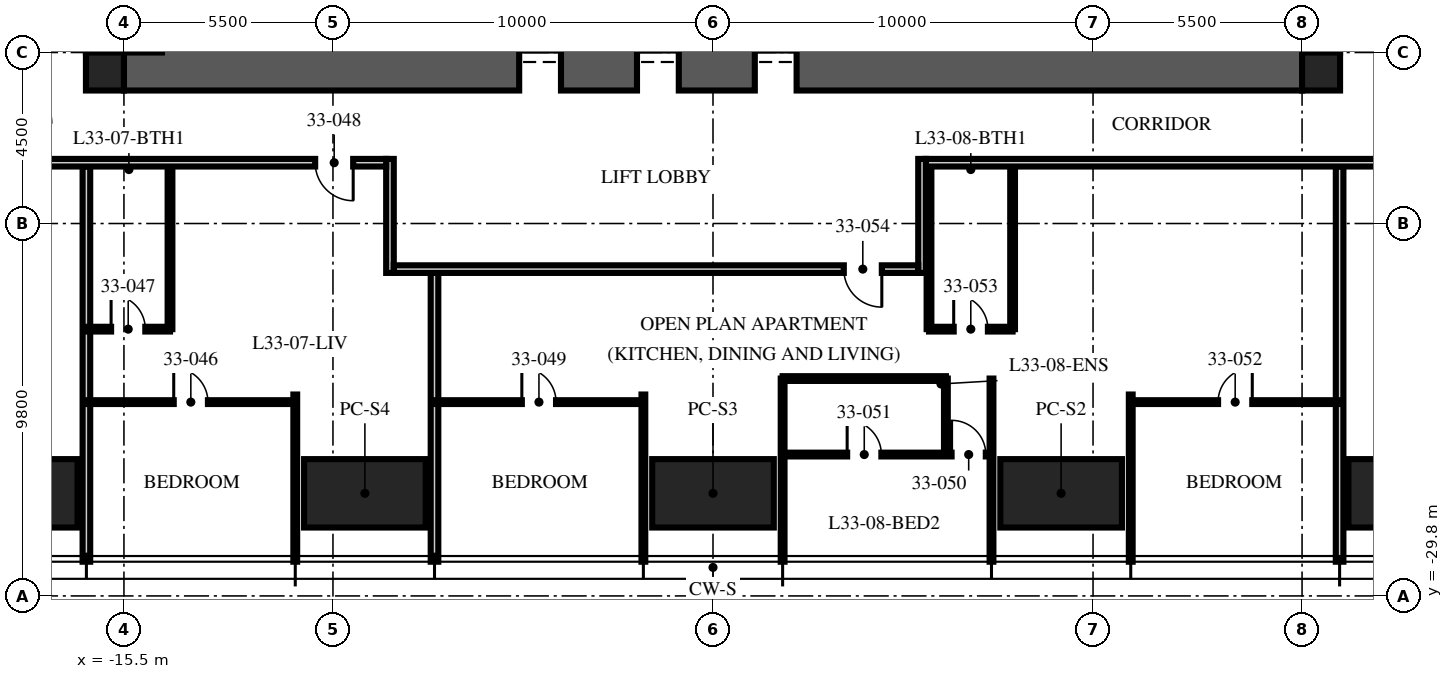
"""IFC4 building model, lengths in metres.
Left out: names, types, materials, properties, quantities, classifications, styles, units other than length and angle.
Written with IfcOpenShell. Run it as: python <this file> out.ifc"""

import sys

from ifc_helpers import new_model, si_unit, direction, frame, frame_2d, origin, origin_2d, place, context, subcontext, project, spatial, rectangle, extrude, element, fill, save


model = new_model("IFC4")
c1 = context("Model", 3, precision=1e-05, world=origin(), true_north=direction((0.0, 1.0)))
c2 = subcontext(c1, "Body", "Model", "MODEL_VIEW")
j1 = project(units=[si_unit("LENGTHUNIT", "METRE"), si_unit("PLANEANGLEUNIT", "RADIAN")], contexts=[c1])
p1 = place(None, origin())
s1 = spatial("IfcSite", under=j1, at=p1, CompositionType="ELEMENT")
p2 = place(p1, origin())
s2 = spatial("IfcBuilding", under=s1, at=p2, CompositionType="ELEMENT")
p3 = place(p2, frame((0.0, 0.0, 133.5)))
s3 = spatial("IfcBuildingStorey", under=s2, at=p3, CompositionType="ELEMENT", Elevation=133.5)
p4 = place(p3, frame((-15.5, -15.5, -0.25), z_axis=(0.0, 0.0, 1.0), x_axis=(1.0, 0.0, 0.0)))
e1 = element("IfcWall", 1, at=p4, inside=s3, PredefinedType="SHEAR", context=c2, shape_type="SweptSolid", body=[
    extrude(rectangle(XDim=31.0, YDim=2.0, at=frame_2d((15.5, 0.0))), origin(), (0.0, 0.0, 1.0), 3.75),
])
p5 = place(p4, frame((10.4, 0.0, 0.25)))
e2 = element("IfcOpeningElement", 2, at=p5, cuts=e1, PredefinedType="OPENING", context=c2, shape_type="SweptSolid", body=[
    extrude(rectangle(XDim=1.1, YDim=2.1, at=frame_2d((0.55, 1.05))), frame((0.0, 1.01, 0.0), z_axis=(0.0, -1.0, 0.0), x_axis=(1.0, 0.0, 0.0)), (0.0, 0.0, 1.0), 2.02),
])
p6 = place(p4, frame((13.5, 0.0, 0.25)))
e3 = element("IfcOpeningElement", 3, at=p6, cuts=e1, PredefinedType="OPENING", context=c2, shape_type="SweptSolid", body=[
    extrude(rectangle(XDim=1.1, YDim=2.1, at=frame_2d((0.55, 1.05))), frame((0.0, 1.01, 0.0), z_axis=(0.0, -1.0, 0.0), x_axis=(1.0, 0.0, 0.0)), (0.0, 0.0, 1.0), 2.02),
])
p7 = place(p4, frame((16.6, 0.0, 0.25)))
e4 = element("IfcOpeningElement", 4, at=p7, cuts=e1, PredefinedType="OPENING", context=c2, shape_type="SweptSolid", body=[
    extrude(rectangle(XDim=1.1, YDim=2.1, at=frame_2d((0.55, 1.05))), frame((0.0, 1.01, 0.0), z_axis=(0.0, -1.0, 0.0), x_axis=(1.0, 0.0, 0.0)), (0.0, 0.0, 1.0), 2.02),
])
for number, where, z_axis, x_axis in (
    (5, (-16.0, -16.0, -0.25), (0.0, 0.0, 1.0), (1.0, 0.0, 0.0)),
    (6, (16.0, -16.0, -0.25), (0.0, 0.0, 1.0), (1.0, 0.0, 0.0)),
):
    element("IfcColumn", number, at=place(p3, frame(where, z_axis=z_axis, x_axis=x_axis)), inside=s3, PredefinedType="COLUMN", context=c2, shape_type="SweptSolid", body=[
        extrude(rectangle(XDim=1.0, YDim=1.0, at=origin_2d()), origin(), (0.0, 0.0, 1.0), 3.75),
    ])
for number, where, z_axis, x_axis in (
    (7, (18.32, -27.1, 0.0), (0.0, 0.0, 1.0), (1.0, 0.0, 0.0)),
    (8, (9.16, -27.1, 0.0), (0.0, 0.0, 1.0), (1.0, 0.0, 0.0)),
    (9, (0.0, -27.1, 0.0), (0.0, 0.0, 1.0), (1.0, 0.0, 0.0)),
    (10, (-9.16, -27.1, 0.0), (0.0, 0.0, 1.0), (1.0, 0.0, 0.0)),
    (11, (-18.32, -27.1, 0.0), (0.0, 0.0, 1.0), (1.0, 0.0, 0.0)),
):
    element("IfcColumn", number, at=place(p3, frame(where, z_axis=z_axis, x_axis=x_axis)), inside=s3, PredefinedType="COLUMN", context=c2, shape_type="SweptSolid", body=[
        extrude(rectangle(XDim=3.2, YDim=1.8, at=origin_2d()), origin(), (0.0, 0.0, 1.0), 3.75),
    ])
p8 = place(p3, frame((-16.488, -18.5, 0.0), z_axis=(0.0, 0.0, 1.0), x_axis=(0.0, -1.0, 0.0)))
e12 = element("IfcWall", 12, at=p8, inside=s3, PredefinedType="PARTITIONING", context=c2, shape_type="SweptSolid", body=[
    extrude(rectangle(XDim=10.4, YDim=0.2, at=frame_2d((5.2, 0.0))), origin(), (0.0, 0.0, 1.0), 2.81),
])
p9 = place(p3, frame((-10.992, -24.5, 0.0), z_axis=(0.0, 0.0, 1.0), x_axis=(0.0, -1.0, 0.0)))
e13 = element("IfcWall", 13, at=p9, inside=s3, PredefinedType="PARTITIONING", context=c2, shape_type="SweptSolid", body=[
    extrude(rectangle(XDim=4.4, YDim=0.1, at=frame_2d((2.2, 0.0))), origin(), (0.0, 0.0, 1.0), 2.81),
])
p10 = place(p3, frame((-7.328, -21.3, 0.0), z_axis=(0.0, 0.0, 1.0), x_axis=(0.0, -1.0, 0.0)))
e14 = element("IfcWall", 14, at=p10, inside=s3, PredefinedType="PARTITIONING", context=c2, shape_type="SweptSolid", body=[
    extrude(rectangle(XDim=7.6, YDim=0.2, at=frame_2d((3.8, 0.0))), origin(), (0.0, 0.0, 1.0), 2.81),
])
p11 = place(p3, frame((-1.832, -24.5, 0.0), z_axis=(0.0, 0.0, 1.0), x_axis=(0.0, -1.0, 0.0)))
e15 = element("IfcWall", 15, at=p11, inside=s3, PredefinedType="PARTITIONING", context=c2, shape_type="SweptSolid", body=[
    extrude(rectangle(XDim=4.4, YDim=0.1, at=frame_2d((2.2, 0.0))), origin(), (0.0, 0.0, 1.0), 2.81),
])
for number, where, z_axis, x_axis in (
    (16, (1.832, -24.08, 0.0), (0.0, 0.0, 1.0), (0.0, -1.0, 0.0)),
    (17, (7.328, -24.08, 0.0), (0.0, 0.0, 1.0), (0.0, -1.0, 0.0)),
):
    element("IfcWall", number, at=place(p3, frame(where, z_axis=z_axis, x_axis=x_axis)), inside=s3, PredefinedType="PARTITIONING", context=c2, shape_type="SweptSolid", body=[
        extrude(rectangle(XDim=4.82, YDim=0.1, at=frame_2d((2.41, 0.0))), origin(), (0.0, 0.0, 1.0), 2.81),
    ])
p12 = place(p3, frame((10.992, -24.5, 0.0), z_axis=(0.0, 0.0, 1.0), x_axis=(0.0, -1.0, 0.0)))
e18 = element("IfcWall", 18, at=p12, inside=s3, PredefinedType="PARTITIONING", context=c2, shape_type="SweptSolid", body=[
    extrude(rectangle(XDim=4.4, YDim=0.1, at=frame_2d((2.2, 0.0))), origin(), (0.0, 0.0, 1.0), 2.81),
])
p13 = place(p3, frame((16.488, -18.5, 0.0), z_axis=(0.0, 0.0, 1.0), x_axis=(0.0, -1.0, 0.0)))
e19 = element("IfcWall", 19, at=p13, inside=s3, PredefinedType="PARTITIONING", context=c2, shape_type="SweptSolid", body=[
    extrude(rectangle(XDim=10.4, YDim=0.2, at=frame_2d((5.2, 0.0))), origin(), (0.0, 0.0, 1.0), 2.81),
])
p14 = place(p3, frame((-16.488, -24.7, 0.0), z_axis=(0.0, 0.0, 1.0), x_axis=(1.0, 0.0, 0.0)))
e20 = element("IfcWall", 20, at=p14, inside=s3, PredefinedType="PARTITIONING", context=c2, shape_type="SweptSolid", body=[
    extrude(rectangle(XDim=5.496, YDim=0.1, at=frame_2d((2.748, 0.0))), origin(), (0.0, 0.0, 1.0), 2.81),
])
p15 = place(p14, frame((2.298, 0.0, 0.0)))
e21 = element("IfcOpeningElement", 21, at=p15, cuts=e20, PredefinedType="OPENING", context=c2, shape_type="SweptSolid", body=[
    extrude(rectangle(XDim=0.9, YDim=2.1, at=frame_2d((0.45, 1.05))), frame((0.0, 0.06, 0.0), z_axis=(0.0, -1.0, 0.0), x_axis=(1.0, 0.0, 0.0)), (0.0, 0.0, 1.0), 0.12),
])
p16 = place(p3, frame((-16.488, -22.78, 0.0), z_axis=(0.0, 0.0, 1.0), x_axis=(1.0, 0.0, 0.0)))
e22 = element("IfcWall", 22, at=p16, inside=s3, PredefinedType="PARTITIONING", context=c2, shape_type="SweptSolid", body=[
    extrude(rectangle(XDim=2.2, YDim=0.125, at=frame_2d((1.1, 0.0))), origin(), (0.0, 0.0, 1.0), 3.5),
])
p17 = place(p16, frame((0.65, 0.0, 0.0)))
e23 = element("IfcOpeningElement", 23, at=p17, cuts=e22, PredefinedType="OPENING", context=c2, shape_type="SweptSolid", body=[
    extrude(rectangle(XDim=0.9, YDim=2.1, at=frame_2d((0.45, 1.05))), frame((0.0, 0.073, 0.0), z_axis=(0.0, -1.0, 0.0), x_axis=(1.0, 0.0, 0.0)), (0.0, 0.0, 1.0), 0.145),
])
p18 = place(p3, frame((-14.288, -18.5, 0.0), z_axis=(0.0, 0.0, 1.0), x_axis=(0.0, -1.0, 0.0)))
e24 = element("IfcWall", 24, at=p18, inside=s3, PredefinedType="PARTITIONING", context=c2, shape_type="SweptSolid", body=[
    extrude(rectangle(XDim=4.28, YDim=0.125, at=frame_2d((2.14, 0.0))), origin(), (0.0, 0.0, 1.0), 3.5),
])
p19 = place(p3, frame((-7.328, -24.7, 0.0), z_axis=(0.0, 0.0, 1.0), x_axis=(1.0, 0.0, 0.0)))
e25 = element("IfcWall", 25, at=p19, inside=s3, PredefinedType="PARTITIONING", context=c2, shape_type="SweptSolid", body=[
    extrude(rectangle(XDim=5.496, YDim=0.1, at=frame_2d((2.748, 0.0))), origin(), (0.0, 0.0, 1.0), 2.81),
])
p20 = place(p19, frame((2.298, 0.0, 0.0)))
e26 = element("IfcOpeningElement", 26, at=p20, cuts=e25, PredefinedType="OPENING", context=c2, shape_type="SweptSolid", body=[
    extrude(rectangle(XDim=0.9, YDim=2.1, at=frame_2d((0.45, 1.05))), frame((0.0, 0.06, 0.0), z_axis=(0.0, -1.0, 0.0), x_axis=(1.0, 0.0, 0.0)), (0.0, 0.0, 1.0), 0.12),
])
p21 = place(p3, frame((1.832, -26.08, 0.0), z_axis=(0.0, 0.0, 1.0), x_axis=(1.0, 0.0, 0.0)))
e27 = element("IfcWall", 27, at=p21, inside=s3, PredefinedType="PARTITIONING", context=c2, shape_type="SweptSolid", body=[
    extrude(rectangle(XDim=5.496, YDim=0.1, at=frame_2d((2.748, 0.0))), origin(), (0.0, 0.0, 1.0), 2.81),
])
p22 = place(p21, frame((4.446, 0.0, 0.0)))
e28 = element("IfcOpeningElement", 28, at=p22, cuts=e27, PredefinedType="OPENING", context=c2, shape_type="SweptSolid", body=[
    extrude(rectangle(XDim=0.9, YDim=2.1, at=frame_2d((0.45, 1.05))), frame((0.0, 0.06, 0.0), z_axis=(0.0, -1.0, 0.0), x_axis=(1.0, 0.0, 0.0)), (0.0, 0.0, 1.0), 0.12),
])
p23 = place(p21, frame((1.698, 0.0, 0.0)))
e29 = element("IfcOpeningElement", 29, at=p23, cuts=e27, PredefinedType="OPENING", context=c2, shape_type="SweptSolid", body=[
    extrude(rectangle(XDim=0.9, YDim=2.1, at=frame_2d((0.45, 1.05))), frame((0.0, 0.06, 0.0), z_axis=(0.0, -1.0, 0.0), x_axis=(1.0, 0.0, 0.0)), (0.0, 0.0, 1.0), 0.12),
])
p24 = place(p3, frame((6.128, -24.08, 0.0), z_axis=(0.0, 0.0, 1.0), x_axis=(0.0, -1.0, 0.0)))
e30 = element("IfcWall", 30, at=p24, inside=s3, PredefinedType="PARTITIONING", context=c2, shape_type="SweptSolid", body=[
    extrude(rectangle(XDim=2.0, YDim=0.1, at=frame_2d((1.0, 0.0))), origin(), (0.0, 0.0, 1.0), 3.5),
])
p25 = place(p3, frame((1.832, -24.08, 0.0), z_axis=(0.0, 0.0, 1.0), x_axis=(1.0, 0.0, 0.0)))
e31 = element("IfcWall", 31, at=p25, inside=s3, PredefinedType="PARTITIONING", context=c2, shape_type="SweptSolid", body=[
    extrude(rectangle(XDim=4.296, YDim=0.125, at=frame_2d((2.148, 0.0))), origin(), (0.0, 0.0, 1.0), 2.81),
])
p26 = place(p3, frame((10.992, -24.7, 0.0), z_axis=(0.0, 0.0, 1.0), x_axis=(1.0, 0.0, 0.0)))
e32 = element("IfcWall", 32, at=p26, inside=s3, PredefinedType="PARTITIONING", context=c2, shape_type="SweptSolid", body=[
    extrude(rectangle(XDim=5.496, YDim=0.1, at=frame_2d((2.748, 0.0))), origin(), (0.0, 0.0, 1.0), 2.81),
])
p27 = place(p26, frame((2.298, 0.0, 0.0)))
e33 = element("IfcOpeningElement", 33, at=p27, cuts=e32, PredefinedType="OPENING", context=c2, shape_type="SweptSolid", body=[
    extrude(rectangle(XDim=0.9, YDim=2.1, at=frame_2d((0.45, 1.05))), frame((0.0, 0.06, 0.0), z_axis=(0.0, -1.0, 0.0), x_axis=(1.0, 0.0, 0.0)), (0.0, 0.0, 1.0), 0.12),
])
p28 = place(p3, frame((5.684, -22.78, 0.0), z_axis=(0.0, 0.0, 1.0), x_axis=(1.0, 0.0, 0.0)))
e34 = element("IfcWall", 34, at=p28, inside=s3, PredefinedType="PARTITIONING", context=c2, shape_type="SweptSolid", body=[
    extrude(rectangle(XDim=2.2, YDim=0.125, at=frame_2d((1.1, 0.0))), origin(), (0.0, 0.0, 1.0), 3.5),
])
p29 = place(p28, frame((0.65, 0.0, 0.0)))
e35 = element("IfcOpeningElement", 35, at=p29, cuts=e34, PredefinedType="OPENING", context=c2, shape_type="SweptSolid", body=[
    extrude(rectangle(XDim=0.9, YDim=2.1, at=frame_2d((0.45, 1.05))), frame((0.0, 0.073, 0.0), z_axis=(0.0, -1.0, 0.0), x_axis=(1.0, 0.0, 0.0)), (0.0, 0.0, 1.0), 0.145),
])
for number, where, z_axis, x_axis in (
    (36, (5.684, -18.5, 0.0), (0.0, 0.0, 1.0), (0.0, -1.0, 0.0)),
    (37, (7.884, -18.5, 0.0), (0.0, 0.0, 1.0), (0.0, -1.0, 0.0)),
):
    element("IfcWall", number, at=place(p3, frame(where, z_axis=z_axis, x_axis=x_axis)), inside=s3, PredefinedType="PARTITIONING", context=c2, shape_type="SweptSolid", body=[
        extrude(rectangle(XDim=4.28, YDim=0.125, at=frame_2d((2.14, 0.0))), origin(), (0.0, 0.0, 1.0), 3.5),
    ])
p30 = place(p3, frame((18.5, -18.4, 0.0), z_axis=(0.0, 0.0, 1.0), x_axis=(-1.0, 0.0, 0.0)))
e38 = element("IfcWall", 38, at=p30, inside=s3, PredefinedType="PARTITIONING", context=c2, shape_type="SweptSolid", body=[
    extrude(rectangle(XDim=12.9, YDim=0.2, at=frame_2d((6.45, 0.0))), origin(), (0.0, 0.0, 1.0), 2.3),
])
for number, where, z_axis, x_axis in (
    (39, (5.5, -18.3, 0.0), (0.0, 0.0, 1.0), (0.0, -1.0, 0.0)),
    (40, (-8.5, -18.3, 0.0), (0.0, 0.0, 1.0), (0.0, -1.0, 0.0)),
):
    element("IfcWall", number, at=place(p3, frame(where, z_axis=z_axis, x_axis=x_axis)), inside=s3, PredefinedType="PARTITIONING", context=c2, shape_type="SweptSolid", body=[
        extrude(rectangle(XDim=3.0, YDim=0.2, at=frame_2d((1.5, 0.0))), origin(), (0.0, 0.0, 1.0), 3.5),
    ])
p31 = place(p3, frame((5.4, -21.2, 0.0), z_axis=(0.0, 0.0, 1.0), x_axis=(-1.0, 0.0, 0.0)))
e41 = element("IfcWall", 41, at=p31, inside=s3, PredefinedType="PARTITIONING", context=c2, shape_type="SweptSolid", body=[
    extrude(rectangle(XDim=13.8, YDim=0.2, at=frame_2d((6.9, 0.0))), origin(), (0.0, 0.0, 1.0), 2.7),
])
p32 = place(p31, frame((0.958, 0.0, 0.0)))
e42 = element("IfcOpeningElement", 42, at=p32, cuts=e41, PredefinedType="OPENING", context=c2, shape_type="SweptSolid", body=[
    extrude(rectangle(XDim=1.0, YDim=2.2, at=frame_2d((0.5, 1.1))), frame((0.0, 0.11, 0.0), z_axis=(0.0, -1.0, 0.0), x_axis=(1.0, 0.0, 0.0)), (0.0, 0.0, 1.0), 0.22),
])
p33 = place(p3, frame((-8.6, -18.4, 0.0), z_axis=(0.0, 0.0, 1.0), x_axis=(-1.0, 0.0, 0.0)))
e43 = element("IfcWall", 43, at=p33, inside=s3, PredefinedType="PARTITIONING", context=c2, shape_type="SweptSolid", body=[
    extrude(rectangle(XDim=9.9, YDim=0.2, at=frame_2d((4.95, 0.0))), origin(), (0.0, 0.0, 1.0), 2.3),
])
p34 = place(p33, frame((0.868, 0.0, 0.0)))
e44 = element("IfcOpeningElement", 44, at=p34, cuts=e43, PredefinedType="OPENING", context=c2, shape_type="SweptSolid", body=[
    extrude(rectangle(XDim=1.0, YDim=2.2, at=frame_2d((0.5, 1.1))), frame((0.0, 0.11, 0.0), z_axis=(0.0, -1.0, 0.0), x_axis=(1.0, 0.0, 0.0)), (0.0, 0.0, 1.0), 0.22),
])
p35 = place(p5, origin())
e45 = element("IfcDoor", 45, at=p35, inside=s3, OperationType="DOUBLE_DOOR_SLIDING", PredefinedType="DOOR", context=c2, shape_type="SweptSolid", body=[
    extrude(rectangle(XDim=1.1, YDim=2.1, at=frame_2d((0.55, 1.05))), frame((0.0, 0.025, 0.0), z_axis=(0.0, -1.0, 0.0), x_axis=(1.0, 0.0, 0.0)), (0.0, 0.0, 1.0), 0.05),
])
fill(e2, e45)
p36 = place(p6, origin())
e46 = element("IfcDoor", 46, at=p36, inside=s3, OperationType="DOUBLE_DOOR_SLIDING", PredefinedType="DOOR", context=c2, shape_type="SweptSolid", body=[
    extrude(rectangle(XDim=1.1, YDim=2.1, at=frame_2d((0.55, 1.05))), frame((0.0, 0.025, 0.0), z_axis=(0.0, -1.0, 0.0), x_axis=(1.0, 0.0, 0.0)), (0.0, 0.0, 1.0), 0.05),
])
fill(e3, e46)
p37 = place(p7, origin())
e47 = element("IfcDoor", 47, at=p37, inside=s3, OperationType="DOUBLE_DOOR_SLIDING", PredefinedType="DOOR", context=c2, shape_type="SweptSolid", body=[
    extrude(rectangle(XDim=1.1, YDim=2.1, at=frame_2d((0.55, 1.05))), frame((0.0, 0.025, 0.0), z_axis=(0.0, -1.0, 0.0), x_axis=(1.0, 0.0, 0.0)), (0.0, 0.0, 1.0), 0.05),
])
fill(e4, e47)
p38 = place(p15, origin())
e48 = element("IfcDoor", 48, at=p38, inside=s3, OperationType="SINGLE_SWING_LEFT", PredefinedType="DOOR", context=c2, shape_type="SweptSolid", body=[
    extrude(rectangle(XDim=0.9, YDim=2.1, at=frame_2d((0.45, 1.05))), frame((0.0, 0.025, 0.0), z_axis=(0.0, -1.0, 0.0), x_axis=(1.0, 0.0, 0.0)), (0.0, 0.0, 1.0), 0.05),
])
fill(e21, e48)
p39 = place(p17, origin())
e49 = element("IfcDoor", 49, at=p39, inside=s3, OperationType="SINGLE_SWING_LEFT", PredefinedType="DOOR", context=c2, shape_type="SweptSolid", body=[
    extrude(rectangle(XDim=0.9, YDim=2.1, at=frame_2d((0.45, 1.05))), frame((0.0, 0.025, 0.0), z_axis=(0.0, -1.0, 0.0), x_axis=(1.0, 0.0, 0.0)), (0.0, 0.0, 1.0), 0.05),
])
fill(e23, e49)
p40 = place(p34, origin())
e50 = element("IfcDoor", 50, at=p40, inside=s3, OperationType="SINGLE_SWING_LEFT", PredefinedType="DOOR", context=c2, shape_type="SweptSolid", body=[
    extrude(rectangle(XDim=1.0, YDim=2.2, at=frame_2d((0.5, 1.1))), frame((0.0, 0.025, 0.0), z_axis=(0.0, -1.0, 0.0), x_axis=(1.0, 0.0, 0.0)), (0.0, 0.0, 1.0), 0.05),
])
fill(e44, e50)
p41 = place(p20, origin())
e51 = element("IfcDoor", 51, at=p41, inside=s3, OperationType="SINGLE_SWING_LEFT", PredefinedType="DOOR", context=c2, shape_type="SweptSolid", body=[
    extrude(rectangle(XDim=0.9, YDim=2.1, at=frame_2d((0.45, 1.05))), frame((0.0, 0.025, 0.0), z_axis=(0.0, -1.0, 0.0), x_axis=(1.0, 0.0, 0.0)), (0.0, 0.0, 1.0), 0.05),
])
fill(e26, e51)
p42 = place(p22, origin())
e52 = element("IfcDoor", 52, at=p42, inside=s3, OperationType="SINGLE_SWING_LEFT", PredefinedType="DOOR", context=c2, shape_type="SweptSolid", body=[
    extrude(rectangle(XDim=0.9, YDim=2.1, at=frame_2d((0.45, 1.05))), frame((0.0, 0.025, 0.0), z_axis=(0.0, -1.0, 0.0), x_axis=(1.0, 0.0, 0.0)), (0.0, 0.0, 1.0), 0.05),
])
fill(e28, e52)
p43 = place(p23, origin())
e53 = element("IfcDoor", 53, at=p43, inside=s3, OperationType="SINGLE_SWING_LEFT", PredefinedType="DOOR", context=c2, shape_type="SweptSolid", body=[
    extrude(rectangle(XDim=0.9, YDim=2.1, at=frame_2d((0.45, 1.05))), frame((0.0, 0.025, 0.0), z_axis=(0.0, -1.0, 0.0), x_axis=(1.0, 0.0, 0.0)), (0.0, 0.0, 1.0), 0.05),
])
fill(e29, e53)
p44 = place(p27, origin())
e54 = element("IfcDoor", 54, at=p44, inside=s3, OperationType="SINGLE_SWING_RIGHT", PredefinedType="DOOR", context=c2, shape_type="SweptSolid", body=[
    extrude(rectangle(XDim=0.9, YDim=2.1, at=frame_2d((0.45, 1.05))), frame((0.0, 0.025, 0.0), z_axis=(0.0, -1.0, 0.0), x_axis=(1.0, 0.0, 0.0)), (0.0, 0.0, 1.0), 0.05),
])
fill(e33, e54)
p45 = place(p29, origin())
e55 = element("IfcDoor", 55, at=p45, inside=s3, OperationType="SINGLE_SWING_LEFT", PredefinedType="DOOR", context=c2, shape_type="SweptSolid", body=[
    extrude(rectangle(XDim=0.9, YDim=2.1, at=frame_2d((0.45, 1.05))), frame((0.0, 0.025, 0.0), z_axis=(0.0, -1.0, 0.0), x_axis=(1.0, 0.0, 0.0)), (0.0, 0.0, 1.0), 0.05),
])
fill(e35, e55)
p46 = place(p32, origin())
e56 = element("IfcDoor", 56, at=p46, inside=s3, OperationType="SINGLE_SWING_LEFT", PredefinedType="DOOR", context=c2, shape_type="SweptSolid", body=[
    extrude(rectangle(XDim=1.0, YDim=2.2, at=frame_2d((0.5, 1.1))), frame((0.0, 0.025, 0.0), z_axis=(0.0, -1.0, 0.0), x_axis=(1.0, 0.0, 0.0)), (0.0, 0.0, 1.0), 0.05),
])
fill(e42, e56)
save(model, sys.argv[1])
